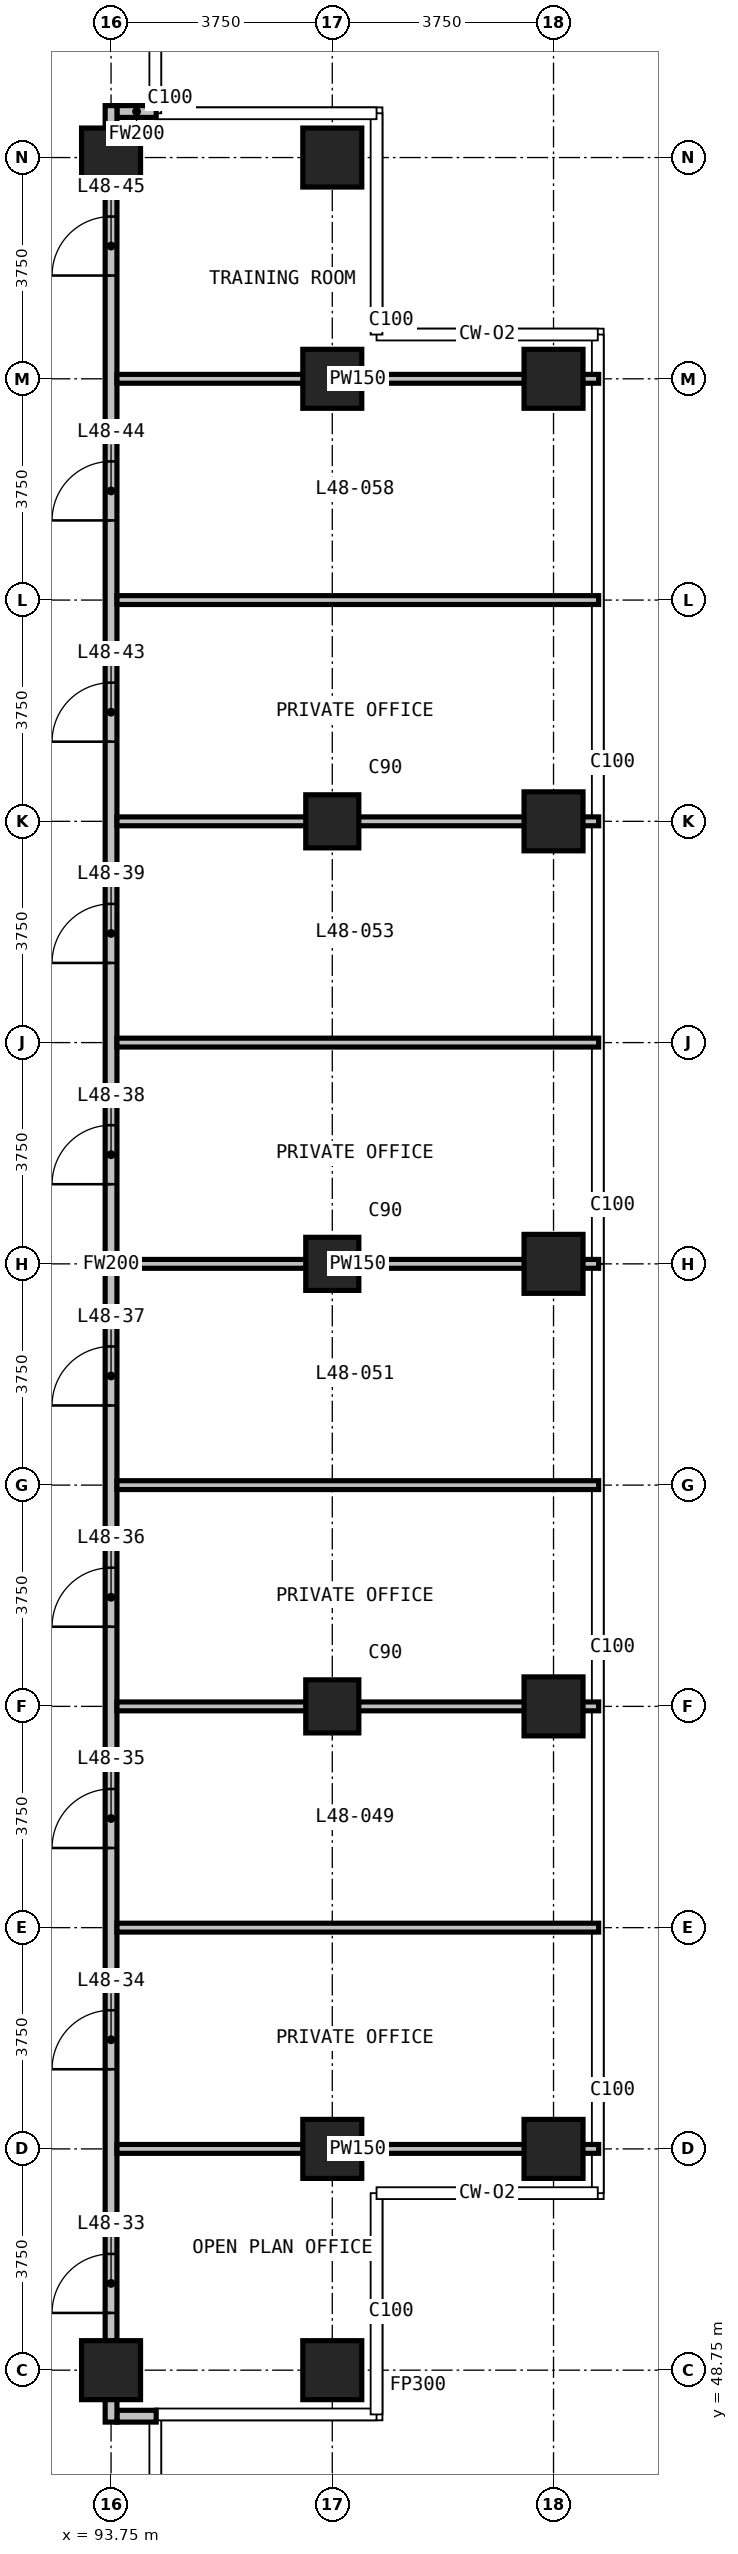
"""IFC4 building model, lengths in metres.
Left out: names, types, materials, properties, quantities, classifications, styles, units other than length and angle.
Written with IfcOpenShell. Run it as: python <this file> out.ifc"""

import sys

from ifc_helpers import new_model, si_unit, direction, frame, frame_2d, origin, origin_2d, place, context, subcontext, project, spatial, rectangle, extrude, element, fill, save


model = new_model("IFC4")
c1 = context("Model", 3, precision=1e-05, world=origin(), true_north=direction((0.0, 1.0)))
c2 = subcontext(c1, "Body", "Model", "MODEL_VIEW")
j1 = project(units=[si_unit("LENGTHUNIT", "METRE"), si_unit("PLANEANGLEUNIT", "RADIAN")], contexts=[c1])
p1 = place(None, origin())
s1 = spatial("IfcSite", under=j1, at=p1, CompositionType="ELEMENT")
p2 = place(p1, origin())
s2 = spatial("IfcBuilding", under=s1, at=p2, CompositionType="ELEMENT")
p3 = place(p2, frame((0.0, 0.0, 188.7)))
s3 = spatial("IfcBuildingStorey", under=s2, at=p3, CompositionType="ELEMENT", Elevation=188.7)
for number, where, z_axis, x_axis in (
    (1, (93.75, 48.75, 0.0), (0.0, 0.0, 1.0), (1.0, 0.0, 0.0)),
    (2, (93.75, 86.25, 0.0), (0.0, 0.0, 1.0), (1.0, 0.0, 0.0)),
    (3, (97.5, 48.75, 0.0), (0.0, 0.0, 1.0), (1.0, 0.0, 0.0)),
    (4, (97.5, 52.5, 0.0), (0.0, 0.0, 1.0), (1.0, 0.0, 0.0)),
):
    element("IfcColumn", number, at=place(p3, frame(where, z_axis=z_axis, x_axis=x_axis)), inside=s3, PredefinedType="COLUMN", context=c2, shape_type="SweptSolid", body=[
        extrude(rectangle(XDim=1.0, YDim=1.0, at=origin_2d()), origin(), (0.0, 0.0, 1.0), 3.6),
    ])
for number, where, z_axis, x_axis in (
    (5, (97.5, 60.0, 0.0), (0.0, 0.0, 1.0), (1.0, 0.0, 0.0)),
    (6, (97.5, 67.5, 0.0), (0.0, 0.0, 1.0), (1.0, 0.0, 0.0)),
    (7, (97.5, 75.0, 0.0), (0.0, 0.0, 1.0), (1.0, 0.0, 0.0)),
):
    element("IfcColumn", number, at=place(p3, frame(where, z_axis=z_axis, x_axis=x_axis)), inside=s3, PredefinedType="COLUMN", context=c2, shape_type="SweptSolid", body=[
        extrude(rectangle(XDim=0.9, YDim=0.9, at=origin_2d()), origin(), (0.0, 0.0, 1.0), 3.6),
    ])
for number, where, z_axis, x_axis in (
    (8, (97.5, 82.5, 0.0), (0.0, 0.0, 1.0), (1.0, 0.0, 0.0)),
    (9, (97.5, 86.25, 0.0), (0.0, 0.0, 1.0), (1.0, 0.0, 0.0)),
    (10, (101.25, 52.5, 0.0), (0.0, 0.0, 1.0), (1.0, 0.0, 0.0)),
    (11, (101.25, 60.0, 0.0), (0.0, 0.0, 1.0), (1.0, 0.0, 0.0)),
    (12, (101.25, 67.5, 0.0), (0.0, 0.0, 1.0), (1.0, 0.0, 0.0)),
    (13, (101.25, 75.0, 0.0), (0.0, 0.0, 1.0), (1.0, 0.0, 0.0)),
    (14, (101.25, 82.5, 0.0), (0.0, 0.0, 1.0), (1.0, 0.0, 0.0)),
):
    element("IfcColumn", number, at=place(p3, frame(where, z_axis=z_axis, x_axis=x_axis)), inside=s3, PredefinedType="COLUMN", context=c2, shape_type="SweptSolid", body=[
        extrude(rectangle(XDim=1.0, YDim=1.0, at=origin_2d()), origin(), (0.0, 0.0, 1.0), 3.6),
    ])
for number, where, z_axis, x_axis in (
    (15, (93.85, 47.97, 0.0), (0.0, 0.0, 1.0), (1.0, 0.0, 0.0)),
    (16, (93.85, 87.03, 0.0), (0.0, 0.0, 1.0), (1.0, 0.0, 0.0)),
):
    element("IfcWall", number, at=place(p3, frame(where, z_axis=z_axis, x_axis=x_axis)), inside=s3, PredefinedType="PARTITIONING", context=c2, shape_type="SweptSolid", body=[
        extrude(rectangle(XDim=0.665, YDim=0.2, at=frame_2d((0.333, 0.0))), origin(), (0.0, 0.0, 1.0), 3.3),
    ])
p4 = place(p3, frame((93.75, 47.87, 0.0), z_axis=(0.0, 0.0, 1.0), x_axis=(0.0, 1.0, 0.0)))
e17 = element("IfcWall", 17, at=p4, inside=s3, PredefinedType="PARTITIONING", context=c2, shape_type="SweptSolid", body=[
    extrude(rectangle(XDim=39.26, YDim=0.2, at=frame_2d((19.63, 0.0))), origin(), (0.0, 0.0, 1.0), 3.3),
])
p5 = place(p4, frame((1.85, 0.0, 0.0)))
e18 = element("IfcOpeningElement", 18, at=p5, cuts=e17, PredefinedType="OPENING", context=c2, shape_type="SweptSolid", body=[
    extrude(rectangle(XDim=1.0, YDim=2.2, at=frame_2d((0.5, 1.1))), frame((0.0, 0.11, 0.0), z_axis=(0.0, -1.0, 0.0), x_axis=(1.0, 0.0, 0.0)), (0.0, 0.0, 1.0), 0.22),
])
p6 = place(p4, frame((5.98, 0.0, 0.0)))
e19 = element("IfcOpeningElement", 19, at=p6, cuts=e17, PredefinedType="OPENING", context=c2, shape_type="SweptSolid", body=[
    extrude(rectangle(XDim=1.0, YDim=2.2, at=frame_2d((0.5, 1.1))), frame((0.0, 0.11, 0.0), z_axis=(0.0, -1.0, 0.0), x_axis=(1.0, 0.0, 0.0)), (0.0, 0.0, 1.0), 0.22),
])
p7 = place(p4, frame((9.73, 0.0, 0.0)))
e20 = element("IfcOpeningElement", 20, at=p7, cuts=e17, PredefinedType="OPENING", context=c2, shape_type="SweptSolid", body=[
    extrude(rectangle(XDim=1.0, YDim=2.2, at=frame_2d((0.5, 1.1))), frame((0.0, 0.11, 0.0), z_axis=(0.0, -1.0, 0.0), x_axis=(1.0, 0.0, 0.0)), (0.0, 0.0, 1.0), 0.22),
])
p8 = place(p4, frame((13.48, 0.0, 0.0)))
e21 = element("IfcOpeningElement", 21, at=p8, cuts=e17, PredefinedType="OPENING", context=c2, shape_type="SweptSolid", body=[
    extrude(rectangle(XDim=1.0, YDim=2.2, at=frame_2d((0.5, 1.1))), frame((0.0, 0.11, 0.0), z_axis=(0.0, -1.0, 0.0), x_axis=(1.0, 0.0, 0.0)), (0.0, 0.0, 1.0), 0.22),
])
p9 = place(p4, frame((17.23, 0.0, 0.0)))
e22 = element("IfcOpeningElement", 22, at=p9, cuts=e17, PredefinedType="OPENING", context=c2, shape_type="SweptSolid", body=[
    extrude(rectangle(XDim=1.0, YDim=2.2, at=frame_2d((0.5, 1.1))), frame((0.0, 0.11, 0.0), z_axis=(0.0, -1.0, 0.0), x_axis=(1.0, 0.0, 0.0)), (0.0, 0.0, 1.0), 0.22),
])
p10 = place(p4, frame((20.98, 0.0, 0.0)))
e23 = element("IfcOpeningElement", 23, at=p10, cuts=e17, PredefinedType="OPENING", context=c2, shape_type="SweptSolid", body=[
    extrude(rectangle(XDim=1.0, YDim=2.2, at=frame_2d((0.5, 1.1))), frame((0.0, 0.11, 0.0), z_axis=(0.0, -1.0, 0.0), x_axis=(1.0, 0.0, 0.0)), (0.0, 0.0, 1.0), 0.22),
])
p11 = place(p4, frame((24.73, 0.0, 0.0)))
e24 = element("IfcOpeningElement", 24, at=p11, cuts=e17, PredefinedType="OPENING", context=c2, shape_type="SweptSolid", body=[
    extrude(rectangle(XDim=1.0, YDim=2.2, at=frame_2d((0.5, 1.1))), frame((0.0, 0.11, 0.0), z_axis=(0.0, -1.0, 0.0), x_axis=(1.0, 0.0, 0.0)), (0.0, 0.0, 1.0), 0.22),
])
p12 = place(p4, frame((28.48, 0.0, 0.0)))
e25 = element("IfcOpeningElement", 25, at=p12, cuts=e17, PredefinedType="OPENING", context=c2, shape_type="SweptSolid", body=[
    extrude(rectangle(XDim=1.0, YDim=2.2, at=frame_2d((0.5, 1.1))), frame((0.0, 0.11, 0.0), z_axis=(0.0, -1.0, 0.0), x_axis=(1.0, 0.0, 0.0)), (0.0, 0.0, 1.0), 0.22),
])
p13 = place(p4, frame((32.23, 0.0, 0.0)))
e26 = element("IfcOpeningElement", 26, at=p13, cuts=e17, PredefinedType="OPENING", context=c2, shape_type="SweptSolid", body=[
    extrude(rectangle(XDim=1.0, YDim=2.2, at=frame_2d((0.5, 1.1))), frame((0.0, 0.11, 0.0), z_axis=(0.0, -1.0, 0.0), x_axis=(1.0, 0.0, 0.0)), (0.0, 0.0, 1.0), 0.22),
])
p14 = place(p4, frame((36.38, 0.0, 0.0)))
e27 = element("IfcOpeningElement", 27, at=p14, cuts=e17, PredefinedType="OPENING", context=c2, shape_type="SweptSolid", body=[
    extrude(rectangle(XDim=1.0, YDim=2.2, at=frame_2d((0.5, 1.1))), frame((0.0, 0.11, 0.0), z_axis=(0.0, -1.0, 0.0), x_axis=(1.0, 0.0, 0.0)), (0.0, 0.0, 1.0), 0.22),
])
for number, where, z_axis, x_axis in (
    (28, (93.85, 52.5, 0.0), (0.0, 0.0, 1.0), (1.0, 0.0, 0.0)),
    (29, (93.85, 56.25, 0.0), (0.0, 0.0, 1.0), (1.0, 0.0, 0.0)),
    (30, (93.85, 60.0, 0.0), (0.0, 0.0, 1.0), (1.0, 0.0, 0.0)),
    (31, (93.85, 63.75, 0.0), (0.0, 0.0, 1.0), (1.0, 0.0, 0.0)),
    (32, (93.85, 67.5, 0.0), (0.0, 0.0, 1.0), (1.0, 0.0, 0.0)),
    (33, (93.85, 71.25, 0.0), (0.0, 0.0, 1.0), (1.0, 0.0, 0.0)),
    (34, (93.85, 75.0, 0.0), (0.0, 0.0, 1.0), (1.0, 0.0, 0.0)),
    (35, (93.85, 78.75, 0.0), (0.0, 0.0, 1.0), (1.0, 0.0, 0.0)),
    (36, (93.85, 82.5, 0.0), (0.0, 0.0, 1.0), (1.0, 0.0, 0.0)),
):
    element("IfcWall", number, at=place(p3, frame(where, z_axis=z_axis, x_axis=x_axis)), inside=s3, PredefinedType="PARTITIONING", context=c2, shape_type="SweptSolid", body=[
        extrude(rectangle(XDim=8.165, YDim=0.15, at=frame_2d((4.083, 0.0))), origin(), (0.0, 0.0, 1.0), 3.3),
    ])
p15 = place(p5, origin())
e37 = element("IfcDoor", 37, at=p15, inside=s3, OperationType="SINGLE_SWING_LEFT", PredefinedType="DOOR", context=c2, shape_type="SweptSolid", body=[
    extrude(rectangle(XDim=1.0, YDim=2.2, at=frame_2d((0.5, 1.1))), frame((0.0, 0.025, 0.0), z_axis=(0.0, -1.0, 0.0), x_axis=(1.0, 0.0, 0.0)), (0.0, 0.0, 1.0), 0.05),
])
fill(e18, e37)
p16 = place(p6, origin())
e38 = element("IfcDoor", 38, at=p16, inside=s3, OperationType="SINGLE_SWING_RIGHT", PredefinedType="DOOR", context=c2, shape_type="SweptSolid", body=[
    extrude(rectangle(XDim=1.0, YDim=2.2, at=frame_2d((0.5, 1.1))), frame((0.0, 0.025, 0.0), z_axis=(0.0, -1.0, 0.0), x_axis=(1.0, 0.0, 0.0)), (0.0, 0.0, 1.0), 0.05),
])
fill(e19, e38)
p17 = place(p7, origin())
e39 = element("IfcDoor", 39, at=p17, inside=s3, OperationType="SINGLE_SWING_RIGHT", PredefinedType="DOOR", context=c2, shape_type="SweptSolid", body=[
    extrude(rectangle(XDim=1.0, YDim=2.2, at=frame_2d((0.5, 1.1))), frame((0.0, 0.025, 0.0), z_axis=(0.0, -1.0, 0.0), x_axis=(1.0, 0.0, 0.0)), (0.0, 0.0, 1.0), 0.05),
])
fill(e20, e39)
p18 = place(p8, origin())
e40 = element("IfcDoor", 40, at=p18, inside=s3, OperationType="SINGLE_SWING_LEFT", PredefinedType="DOOR", context=c2, shape_type="SweptSolid", body=[
    extrude(rectangle(XDim=1.0, YDim=2.2, at=frame_2d((0.5, 1.1))), frame((0.0, 0.025, 0.0), z_axis=(0.0, -1.0, 0.0), x_axis=(1.0, 0.0, 0.0)), (0.0, 0.0, 1.0), 0.05),
])
fill(e21, e40)
p19 = place(p9, origin())
e41 = element("IfcDoor", 41, at=p19, inside=s3, OperationType="SINGLE_SWING_LEFT", PredefinedType="DOOR", context=c2, shape_type="SweptSolid", body=[
    extrude(rectangle(XDim=1.0, YDim=2.2, at=frame_2d((0.5, 1.1))), frame((0.0, 0.025, 0.0), z_axis=(0.0, -1.0, 0.0), x_axis=(1.0, 0.0, 0.0)), (0.0, 0.0, 1.0), 0.05),
])
fill(e22, e41)
p20 = place(p10, origin())
e42 = element("IfcDoor", 42, at=p20, inside=s3, OperationType="SINGLE_SWING_RIGHT", PredefinedType="DOOR", context=c2, shape_type="SweptSolid", body=[
    extrude(rectangle(XDim=1.0, YDim=2.2, at=frame_2d((0.5, 1.1))), frame((0.0, 0.025, 0.0), z_axis=(0.0, -1.0, 0.0), x_axis=(1.0, 0.0, 0.0)), (0.0, 0.0, 1.0), 0.05),
])
fill(e23, e42)
p21 = place(p11, origin())
e43 = element("IfcDoor", 43, at=p21, inside=s3, OperationType="SINGLE_SWING_LEFT", PredefinedType="DOOR", context=c2, shape_type="SweptSolid", body=[
    extrude(rectangle(XDim=1.0, YDim=2.2, at=frame_2d((0.5, 1.1))), frame((0.0, 0.025, 0.0), z_axis=(0.0, -1.0, 0.0), x_axis=(1.0, 0.0, 0.0)), (0.0, 0.0, 1.0), 0.05),
])
fill(e24, e43)
p22 = place(p12, origin())
e44 = element("IfcDoor", 44, at=p22, inside=s3, OperationType="SINGLE_SWING_RIGHT", PredefinedType="DOOR", context=c2, shape_type="SweptSolid", body=[
    extrude(rectangle(XDim=1.0, YDim=2.2, at=frame_2d((0.5, 1.1))), frame((0.0, 0.025, 0.0), z_axis=(0.0, -1.0, 0.0), x_axis=(1.0, 0.0, 0.0)), (0.0, 0.0, 1.0), 0.05),
])
fill(e25, e44)
p23 = place(p13, origin())
e45 = element("IfcDoor", 45, at=p23, inside=s3, OperationType="SINGLE_SWING_LEFT", PredefinedType="DOOR", context=c2, shape_type="SweptSolid", body=[
    extrude(rectangle(XDim=1.0, YDim=2.2, at=frame_2d((0.5, 1.1))), frame((0.0, 0.025, 0.0), z_axis=(0.0, -1.0, 0.0), x_axis=(1.0, 0.0, 0.0)), (0.0, 0.0, 1.0), 0.05),
])
fill(e26, e45)
p24 = place(p14, origin())
e46 = element("IfcDoor", 46, at=p24, inside=s3, OperationType="SINGLE_SWING_LEFT", PredefinedType="DOOR", context=c2, shape_type="SweptSolid", body=[
    extrude(rectangle(XDim=1.0, YDim=2.2, at=frame_2d((0.5, 1.1))), frame((0.0, 0.025, 0.0), z_axis=(0.0, -1.0, 0.0), x_axis=(1.0, 0.0, 0.0)), (0.0, 0.0, 1.0), 0.05),
])
fill(e27, e46)
save(model, sys.argv[1])
